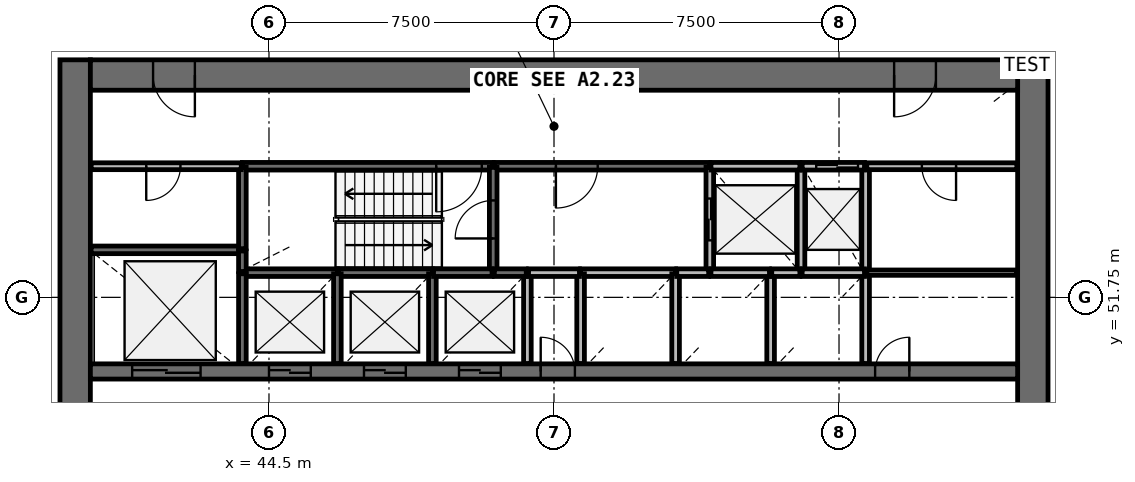
"""IFC4 building model, lengths in metres.
Left out: names, types, materials, properties, quantities, classifications, styles, units other than length and angle.
Written with IfcOpenShell. Run it as: python <this file> out.ifc"""

import sys

from ifc_helpers import new_model, si_unit, direction, frame, frame_2d, origin, place, context, subcontext, project, spatial, rectangle, extrude, source, transform, mapped, element, fill, save


model = new_model("IFC4")
c1 = context("Model", 3, precision=1e-05, world=origin(), true_north=direction((0.0, 1.0)))
c2 = subcontext(c1, "Body", "Model", "MODEL_VIEW")
j1 = project(units=[si_unit("LENGTHUNIT", "METRE"), si_unit("PLANEANGLEUNIT", "RADIAN")], contexts=[c1])
p1 = place(None, origin())
s1 = spatial("IfcSite", under=j1, at=p1, CompositionType="ELEMENT")
p2 = place(p1, origin())
s2 = spatial("IfcBuilding", under=s1, at=p2, CompositionType="ELEMENT")
p3 = place(p2, frame((0.0, 0.0, 96.2)))
s3 = spatial("IfcBuildingStorey", under=s2, at=p3, CompositionType="ELEMENT", Elevation=96.2)
p4 = place(p3, frame((64.6, 38.0, 0.0), z_axis=(0.0, 0.0, 1.0), x_axis=(0.0, 1.0, 0.0)))
e1 = element("IfcWall", 1, at=p4, inside=s3, PredefinedType="SHEAR", context=c2, shape_type="SweptSolid", body=[
    extrude(rectangle(XDim=20.0, YDim=0.8, at=frame_2d((10.0, 0.0))), origin(), (0.0, 0.0, 1.0), 4.1),
])
p5 = place(p4, frame((9.1, 0.0, 0.0)))
e2 = element("IfcOpeningElement", 2, at=p5, cuts=e1, PredefinedType="OPENING", context=c2, shape_type="SweptSolid", body=[
    extrude(rectangle(XDim=1.8, YDim=2.1, at=frame_2d((0.9, 1.05))), frame((0.0, 0.41, 0.0), z_axis=(0.0, -1.0, 0.0), x_axis=(1.0, 0.0, 0.0)), (0.0, 0.0, 1.0), 0.82),
])
p6 = place(p3, frame((39.4, 58.0, 0.0), z_axis=(0.0, 0.0, 1.0), x_axis=(0.0, -1.0, 0.0)))
e3 = element("IfcWall", 3, at=p6, inside=s3, PredefinedType="SHEAR", context=c2, shape_type="SweptSolid", body=[
    extrude(rectangle(XDim=20.0, YDim=0.8, at=frame_2d((10.0, 0.0))), origin(), (0.0, 0.0, 1.0), 4.1),
])
p7 = place(p6, frame((9.1, 0.0, 0.0)))
e4 = element("IfcOpeningElement", 4, at=p7, cuts=e3, PredefinedType="OPENING", context=c2, shape_type="SweptSolid", body=[
    extrude(rectangle(XDim=1.8, YDim=2.1, at=frame_2d((0.9, 1.05))), frame((0.0, 0.41, 0.0), z_axis=(0.0, -1.0, 0.0), x_axis=(1.0, 0.0, 0.0)), (0.0, 0.0, 1.0), 0.82),
])
p8 = place(p3, frame((64.2, 57.6, 0.0), z_axis=(0.0, 0.0, 1.0), x_axis=(-1.0, 0.0, 0.0)))
e5 = element("IfcWall", 5, at=p8, inside=s3, PredefinedType="SHEAR", context=c2, shape_type="SweptSolid", body=[
    extrude(rectangle(XDim=24.4, YDim=0.8, at=frame_2d((12.2, 0.0))), origin(), (0.0, 0.0, 1.0), 4.1),
])
p9 = place(p8, frame((21.65, 0.0, 0.0)))
e6 = element("IfcOpeningElement", 6, at=p9, cuts=e5, PredefinedType="OPENING", context=c2, shape_type="SweptSolid", body=[
    extrude(rectangle(XDim=1.1, YDim=2.1, at=frame_2d((0.55, 1.05))), frame((0.0, 0.41, 0.0), z_axis=(0.0, -1.0, 0.0), x_axis=(1.0, 0.0, 0.0)), (0.0, 0.0, 1.0), 0.82),
])
p10 = place(p8, frame((2.15, 0.0, 0.0)))
e7 = element("IfcOpeningElement", 7, at=p10, cuts=e5, PredefinedType="OPENING", context=c2, shape_type="SweptSolid", body=[
    extrude(rectangle(XDim=1.1, YDim=2.1, at=frame_2d((0.55, 1.05))), frame((0.0, 0.41, 0.0), z_axis=(0.0, -1.0, 0.0), x_axis=(1.0, 0.0, 0.0)), (0.0, 0.0, 1.0), 0.82),
])
p11 = place(p3, frame((39.8, 49.8, 0.0), z_axis=(0.0, 0.0, 1.0), x_axis=(1.0, 0.0, 0.0)))
e8 = element("IfcWall", 8, at=p11, inside=s3, PredefinedType="SHEAR", context=c2, shape_type="SweptSolid", body=[
    extrude(rectangle(XDim=24.4, YDim=0.4, at=frame_2d((12.2, 0.0))), origin(), (0.0, 0.0, 1.0), 4.1),
])
p12 = place(p11, frame((4.7, 0.0, 0.0)))
e9 = element("IfcOpeningElement", 9, at=p12, cuts=e8, PredefinedType="OPENING", context=c2, shape_type="SweptSolid", body=[
    extrude(rectangle(XDim=1.1, YDim=2.1, at=frame_2d((0.55, 1.05))), frame((0.0, 0.21, 0.0), z_axis=(0.0, -1.0, 0.0), x_axis=(1.0, 0.0, 0.0)), (0.0, 0.0, 1.0), 0.42),
])
p13 = place(p11, frame((7.2, 0.0, 0.0)))
e10 = element("IfcOpeningElement", 10, at=p13, cuts=e8, PredefinedType="OPENING", context=c2, shape_type="SweptSolid", body=[
    extrude(rectangle(XDim=1.1, YDim=2.1, at=frame_2d((0.55, 1.05))), frame((0.0, 0.21, 0.0), z_axis=(0.0, -1.0, 0.0), x_axis=(1.0, 0.0, 0.0)), (0.0, 0.0, 1.0), 0.42),
])
p14 = place(p11, frame((9.7, 0.0, 0.0)))
e11 = element("IfcOpeningElement", 11, at=p14, cuts=e8, PredefinedType="OPENING", context=c2, shape_type="SweptSolid", body=[
    extrude(rectangle(XDim=1.1, YDim=2.1, at=frame_2d((0.55, 1.05))), frame((0.0, 0.21, 0.0), z_axis=(0.0, -1.0, 0.0), x_axis=(1.0, 0.0, 0.0)), (0.0, 0.0, 1.0), 0.42),
])
p15 = place(p11, frame((1.1, 0.0, 0.0)))
e12 = element("IfcOpeningElement", 12, at=p15, cuts=e8, PredefinedType="OPENING", context=c2, shape_type="SweptSolid", body=[
    extrude(rectangle(XDim=1.8, YDim=2.4, at=frame_2d((0.9, 1.2))), frame((0.0, 0.21, 0.0), z_axis=(0.0, -1.0, 0.0), x_axis=(1.0, 0.0, 0.0)), (0.0, 0.0, 1.0), 0.42),
])
p16 = place(p11, frame((20.65, 0.0, 0.0)))
e13 = element("IfcOpeningElement", 13, at=p16, cuts=e8, PredefinedType="OPENING", context=c2, shape_type="SweptSolid", body=[
    extrude(rectangle(XDim=0.9, YDim=2.1, at=frame_2d((0.45, 1.05))), frame((0.0, 0.21, 0.0), z_axis=(0.0, -1.0, 0.0), x_axis=(1.0, 0.0, 0.0)), (0.0, 0.0, 1.0), 0.42),
])
p17 = place(p11, frame((11.85, 0.0, 0.0)))
e14 = element("IfcOpeningElement", 14, at=p17, cuts=e8, PredefinedType="OPENING", context=c2, shape_type="SweptSolid", body=[
    extrude(rectangle(XDim=0.9, YDim=2.1, at=frame_2d((0.45, 1.05))), frame((0.0, 0.21, 0.0), z_axis=(0.0, -1.0, 0.0), x_axis=(1.0, 0.0, 0.0)), (0.0, 0.0, 1.0), 0.42),
])
p18 = place(p3, frame((50.4, 55.2, 0.0), z_axis=(0.0, 0.0, 1.0), x_axis=(-1.0, 0.0, 0.0)))
e15 = element("IfcWall", 15, at=p18, inside=s3, PredefinedType="SOLIDWALL", context=c2, shape_type="SweptSolid", body=[
    extrude(rectangle(XDim=6.6, YDim=0.2, at=frame_2d((3.3, 0.0))), origin(), (0.0, 0.0, 1.0), 3.7),
])
p19 = place(p18, frame((0.3, 0.0, 0.0)))
e16 = element("IfcOpeningElement", 16, at=p19, cuts=e15, PredefinedType="OPENING", context=c2, shape_type="SweptSolid", body=[
    extrude(rectangle(XDim=1.2, YDim=2.1, at=frame_2d((0.6, 1.05))), frame((0.0, 0.11, 0.0), z_axis=(0.0, -1.0, 0.0), x_axis=(1.0, 0.0, 0.0)), (0.0, 0.0, 1.0), 0.22),
])
p20 = place(p3, frame((56.1, 55.2, 0.0), z_axis=(0.0, 0.0, 1.0), x_axis=(-1.0, 0.0, 0.0)))
e17 = element("IfcWall", 17, at=p20, inside=s3, PredefinedType="SOLIDWALL", context=c2, shape_type="SweptSolid", body=[
    extrude(rectangle(XDim=5.67, YDim=0.2, at=frame_2d((2.835, 0.0))), origin(), (0.0, 0.0, 1.0), 3.7),
])
p21 = place(p20, frame((2.95, 0.0, 0.0)))
e18 = element("IfcOpeningElement", 18, at=p21, cuts=e17, PredefinedType="OPENING", context=c2, shape_type="SweptSolid", body=[
    extrude(rectangle(XDim=1.1, YDim=2.1, at=frame_2d((0.55, 1.05))), frame((0.0, 0.11, 0.0), z_axis=(0.0, -1.0, 0.0), x_axis=(1.0, 0.0, 0.0)), (0.0, 0.0, 1.0), 0.22),
])
p22 = place(p3, frame((43.8, 53.0, 0.0), z_axis=(0.0, 0.0, 1.0), x_axis=(-1.0, 0.0, 0.0)))
e19 = element("IfcWall", 19, at=p22, inside=s3, PredefinedType="SOLIDWALL", context=c2, shape_type="SweptSolid", body=[
    extrude(rectangle(XDim=3.98, YDim=0.2, at=frame_2d((1.99, 0.0))), origin(), (0.0, 0.0, 1.0), 3.7),
])
p23 = place(p3, frame((50.4, 52.4, 0.0), z_axis=(0.0, 0.0, 1.0), x_axis=(0.0, 1.0, 0.0)))
e20 = element("IfcWall", 20, at=p23, inside=s3, PredefinedType="SOLIDWALL", context=c2, shape_type="SweptSolid", body=[
    extrude(rectangle(XDim=2.77, YDim=0.2, at=frame_2d((1.385, 0.0))), origin(), (0.0, 0.0, 1.0), 3.7),
])
p24 = place(p23, frame((0.9, 0.0, 0.0)))
e21 = element("IfcOpeningElement", 21, at=p24, cuts=e20, PredefinedType="OPENING", context=c2, shape_type="SweptSolid", body=[
    extrude(rectangle(XDim=1.0, YDim=2.1, at=frame_2d((0.5, 1.05))), frame((0.0, 0.11, 0.0), z_axis=(0.0, -1.0, 0.0), x_axis=(1.0, 0.0, 0.0)), (0.0, 0.0, 1.0), 0.22),
])
p25 = place(p3, frame((56.1, 55.17, 0.0), z_axis=(0.0, 0.0, 1.0), x_axis=(0.0, -1.0, 0.0)))
e22 = element("IfcWall", 22, at=p25, inside=s3, PredefinedType="SOLIDWALL", context=c2, shape_type="SweptSolid", body=[
    extrude(rectangle(XDim=2.77, YDim=0.2, at=frame_2d((1.385, 0.0))), origin(), (0.0, 0.0, 1.0), 3.7),
])
p26 = place(p25, frame((0.82, 0.0, 0.0)))
e23 = element("IfcOpeningElement", 23, at=p26, cuts=e22, PredefinedType="OPENING", context=c2, shape_type="SweptSolid", body=[
    extrude(rectangle(XDim=1.1, YDim=2.1, at=frame_2d((0.55, 1.05))), frame((0.0, 0.11, 0.0), z_axis=(0.0, -1.0, 0.0), x_axis=(1.0, 0.0, 0.0)), (0.0, 0.0, 1.0), 0.22),
])
for number, where, z_axis, x_axis in (
    (24, (58.5, 52.4, 0.0), (0.0, 0.0, 1.0), (0.0, 1.0, 0.0)),
    (25, (60.2, 52.4, 0.0), (0.0, 0.0, 1.0), (0.0, 1.0, 0.0)),
):
    element("IfcWall", number, at=place(p3, frame(where, z_axis=z_axis, x_axis=x_axis)), inside=s3, PredefinedType="SOLIDWALL", context=c2, shape_type="SweptSolid", body=[
        extrude(rectangle(XDim=2.8, YDim=0.2, at=frame_2d((1.4, 0.0))), origin(), (0.0, 0.0, 1.0), 3.7),
    ])
p27 = place(p3, frame((46.3, 52.4, 0.0), z_axis=(0.0, 0.0, 1.0), x_axis=(-1.0, 0.0, 0.0)))
e26 = element("IfcWall", 26, at=p27, inside=s3, PredefinedType="SOLIDWALL", context=c2, shape_type="SweptSolid", body=[
    extrude(rectangle(XDim=2.5, YDim=0.2, at=frame_2d((1.25, 0.0))), origin(), (0.0, 0.0, 1.0), 3.7),
])
p28 = place(p3, frame((48.8, 52.4, 0.0), z_axis=(0.0, 0.0, 1.0), x_axis=(-1.0, 0.0, 0.0)))
e27 = element("IfcWall", 27, at=p28, inside=s3, PredefinedType="SOLIDWALL", context=c2, shape_type="SweptSolid", body=[
    extrude(rectangle(XDim=2.47, YDim=0.2, at=frame_2d((1.235, 0.0))), origin(), (0.0, 0.0, 1.0), 3.7),
])
p29 = place(p3, frame((55.2, 52.4, 0.0), z_axis=(0.0, 0.0, 1.0), x_axis=(-1.0, 0.0, 0.0)))
e28 = element("IfcWall", 28, at=p29, inside=s3, PredefinedType="SOLIDWALL", context=c2, shape_type="SweptSolid", body=[
    extrude(rectangle(XDim=2.5, YDim=0.2, at=frame_2d((1.25, 0.0))), origin(), (0.0, 0.0, 1.0), 3.7),
])
p30 = place(p3, frame((58.47, 55.2, 0.0), z_axis=(0.0, 0.0, 1.0), x_axis=(-1.0, 0.0, 0.0)))
e29 = element("IfcWall", 29, at=p30, inside=s3, PredefinedType="SOLIDWALL", context=c2, shape_type="SweptSolid", body=[
    extrude(rectangle(XDim=2.34, YDim=0.2, at=frame_2d((1.17, 0.0))), origin(), (0.0, 0.0, 1.0), 3.7),
])
for number, where, z_axis, x_axis in (
    (30, (43.8, 52.37, 0.0), (0.0, 0.0, 1.0), (0.0, -1.0, 0.0)),
    (31, (46.3, 50.01, 0.0), (0.0, 0.0, 1.0), (0.0, 1.0, 0.0)),
    (32, (48.8, 50.01, 0.0), (0.0, 0.0, 1.0), (0.0, 1.0, 0.0)),
):
    element("IfcWall", number, at=place(p3, frame(where, z_axis=z_axis, x_axis=x_axis)), inside=s3, PredefinedType="SOLIDWALL", context=c2, shape_type="SweptSolid", body=[
        extrude(rectangle(XDim=2.36, YDim=0.2, at=frame_2d((1.18, 0.0))), origin(), (0.0, 0.0, 1.0), 3.7),
    ])
p31 = place(p3, frame((51.3, 50.01, 0.0), z_axis=(0.0, 0.0, 1.0), x_axis=(0.0, 1.0, 0.0)))
e33 = element("IfcWall", 33, at=p31, inside=s3, PredefinedType="SOLIDWALL", context=c2, shape_type="SweptSolid", body=[
    extrude(rectangle(XDim=2.39, YDim=0.2, at=frame_2d((1.195, 0.0))), origin(), (0.0, 0.0, 1.0), 3.7),
])
for number, where, z_axis, x_axis in (
    (34, (52.7, 52.37, 0.0), (0.0, 0.0, 1.0), (0.0, -1.0, 0.0)),
    (35, (55.2, 50.01, 0.0), (0.0, 0.0, 1.0), (0.0, 1.0, 0.0)),
):
    element("IfcWall", number, at=place(p3, frame(where, z_axis=z_axis, x_axis=x_axis)), inside=s3, PredefinedType="SOLIDWALL", context=c2, shape_type="SweptSolid", body=[
        extrude(rectangle(XDim=2.36, YDim=0.2, at=frame_2d((1.18, 0.0))), origin(), (0.0, 0.0, 1.0), 3.7),
    ])
p32 = place(p3, frame((57.7, 50.01, 0.0), z_axis=(0.0, 0.0, 1.0), x_axis=(0.0, 1.0, 0.0)))
e36 = element("IfcWall", 36, at=p32, inside=s3, PredefinedType="SOLIDWALL", context=c2, shape_type="SweptSolid", body=[
    extrude(rectangle(XDim=2.39, YDim=0.2, at=frame_2d((1.195, 0.0))), origin(), (0.0, 0.0, 1.0), 3.7),
])
p33 = place(p3, frame((60.2, 50.01, 0.0), z_axis=(0.0, 0.0, 1.0), x_axis=(0.0, 1.0, 0.0)))
e37 = element("IfcWall", 37, at=p33, inside=s3, PredefinedType="SOLIDWALL", context=c2, shape_type="SweptSolid", body=[
    extrude(rectangle(XDim=2.36, YDim=0.2, at=frame_2d((1.18, 0.0))), origin(), (0.0, 0.0, 1.0), 3.7),
])
p34 = place(p3, frame((43.8, 55.17, 0.0), z_axis=(0.0, 0.0, 1.0), x_axis=(0.0, -1.0, 0.0)))
e38 = element("IfcWall", 38, at=p34, inside=s3, PredefinedType="SOLIDWALL", context=c2, shape_type="SweptSolid", body=[
    extrude(rectangle(XDim=2.14, YDim=0.2, at=frame_2d((1.07, 0.0))), origin(), (0.0, 0.0, 1.0), 3.7),
])
p35 = place(p3, frame((60.17, 52.4, 0.0), z_axis=(0.0, 0.0, 1.0), x_axis=(-1.0, 0.0, 0.0)))
e39 = element("IfcWall", 39, at=p35, inside=s3, PredefinedType="SOLIDWALL", context=c2, shape_type="SweptSolid", body=[
    extrude(rectangle(XDim=1.64, YDim=0.2, at=frame_2d((0.82, 0.0))), origin(), (0.0, 0.0, 1.0), 3.7),
])
p36 = place(p3, frame((60.17, 55.2, 0.0), z_axis=(0.0, 0.0, 1.0), x_axis=(-1.0, 0.0, 0.0)))
e40 = element("IfcWall", 40, at=p36, inside=s3, PredefinedType="SOLIDWALL", context=c2, shape_type="SweptSolid", body=[
    extrude(rectangle(XDim=1.64, YDim=0.2, at=frame_2d((0.82, 0.0))), origin(), (0.0, 0.0, 1.0), 3.7),
])
p37 = place(p36, frame((0.17, 0.0, 0.0)))
e41 = element("IfcOpeningElement", 41, at=p37, cuts=e40, PredefinedType="OPENING", context=c2, shape_type="SweptSolid", body=[
    extrude(rectangle(XDim=1.1, YDim=2.1, at=frame_2d((0.55, 1.05))), frame((0.0, 0.11, 0.0), z_axis=(0.0, -1.0, 0.0), x_axis=(1.0, 0.0, 0.0)), (0.0, 0.0, 1.0), 0.22),
])
for number, where, z_axis, x_axis in (
    (42, (50.37, 52.4, 0.0), (0.0, 0.0, 1.0), (-1.0, 0.0, 0.0)),
    (43, (57.67, 52.4, 0.0), (0.0, 0.0, 1.0), (-1.0, 0.0, 0.0)),
):
    element("IfcWall", number, at=place(p3, frame(where, z_axis=z_axis, x_axis=x_axis)), inside=s3, PredefinedType="SOLIDWALL", context=c2, shape_type="SweptSolid", body=[
        extrude(rectangle(XDim=1.54, YDim=0.2, at=frame_2d((0.77, 0.0))), origin(), (0.0, 0.0, 1.0), 3.7),
    ])
p38 = place(p3, frame((51.33, 52.4, 0.0), z_axis=(0.0, 0.0, 1.0), x_axis=(1.0, 0.0, 0.0)))
e44 = element("IfcWall", 44, at=p38, inside=s3, PredefinedType="SOLIDWALL", context=c2, shape_type="SweptSolid", body=[
    extrude(rectangle(XDim=1.34, YDim=0.2, at=frame_2d((0.67, 0.0))), origin(), (0.0, 0.0, 1.0), 3.7),
])
for number, where, z_axis, x_axis in (
    (45, (51.27, 52.4, 0.0), (0.0, 0.0, 1.0), (-1.0, 0.0, 0.0)),
    (46, (56.07, 52.4, 0.0), (0.0, 0.0, 1.0), (-1.0, 0.0, 0.0)),
):
    element("IfcWall", number, at=place(p3, frame(where, z_axis=z_axis, x_axis=x_axis)), inside=s3, PredefinedType="SOLIDWALL", context=c2, shape_type="SweptSolid", body=[
        extrude(rectangle(XDim=0.84, YDim=0.2, at=frame_2d((0.42, 0.0))), origin(), (0.0, 0.0, 1.0), 3.7),
    ])
p39 = place(p3, frame((58.47, 52.4, 0.0), z_axis=(0.0, 0.0, 1.0), x_axis=(-1.0, 0.0, 0.0)))
e47 = element("IfcWall", 47, at=p39, inside=s3, PredefinedType="SOLIDWALL", context=c2, shape_type="SweptSolid", body=[
    extrude(rectangle(XDim=0.74, YDim=0.2, at=frame_2d((0.37, 0.0))), origin(), (0.0, 0.0, 1.0), 3.7),
])
p40 = place(p3, frame((43.8, 52.43, 0.0), z_axis=(0.0, 0.0, 1.0), x_axis=(0.0, 1.0, 0.0)))
e48 = element("IfcWall", 48, at=p40, inside=s3, PredefinedType="SOLIDWALL", context=c2, shape_type="SweptSolid", body=[
    extrude(rectangle(XDim=0.54, YDim=0.2, at=frame_2d((0.27, 0.0))), origin(), (0.0, 0.0, 1.0), 3.7),
])
p41 = place(p3, frame((64.18, 55.2, 0.0), z_axis=(0.0, 0.0, 1.0), x_axis=(-1.0, 0.0, 0.0)))
e49 = element("IfcWall", 49, at=p41, inside=s3, PredefinedType="PARTITIONING", context=c2, shape_type="SweptSolid", body=[
    extrude(rectangle(XDim=3.95, YDim=0.18, at=frame_2d((1.975, 0.0))), origin(), (0.0, 0.0, 1.0), 3.7),
])
p42 = place(p41, frame((1.6, 0.0, 0.0)))
e50 = element("IfcOpeningElement", 50, at=p42, cuts=e49, PredefinedType="OPENING", context=c2, shape_type="SweptSolid", body=[
    extrude(rectangle(XDim=0.9, YDim=2.1, at=frame_2d((0.45, 1.05))), frame((0.0, 0.1, 0.0), z_axis=(0.0, -1.0, 0.0), x_axis=(1.0, 0.0, 0.0)), (0.0, 0.0, 1.0), 0.2),
])
p43 = place(p3, frame((43.77, 55.2, 0.0), z_axis=(0.0, 0.0, 1.0), x_axis=(-1.0, 0.0, 0.0)))
e51 = element("IfcWall", 51, at=p43, inside=s3, PredefinedType="PARTITIONING", context=c2, shape_type="SweptSolid", body=[
    extrude(rectangle(XDim=3.95, YDim=0.18, at=frame_2d((1.975, 0.0))), origin(), (0.0, 0.0, 1.0), 3.7),
])
p44 = place(p43, frame((1.6, 0.0, 0.0)))
e52 = element("IfcOpeningElement", 52, at=p44, cuts=e51, PredefinedType="OPENING", context=c2, shape_type="SweptSolid", body=[
    extrude(rectangle(XDim=0.9, YDim=2.1, at=frame_2d((0.45, 1.05))), frame((0.0, 0.1, 0.0), z_axis=(0.0, -1.0, 0.0), x_axis=(1.0, 0.0, 0.0)), (0.0, 0.0, 1.0), 0.2),
])
p45 = place(p3, frame((64.18, 52.4, 0.0), z_axis=(0.0, 0.0, 1.0), x_axis=(-1.0, 0.0, 0.0)))
e53 = element("IfcWall", 53, at=p45, inside=s3, PredefinedType="PARTITIONING", context=c2, shape_type="SweptSolid", body=[
    extrude(rectangle(XDim=3.95, YDim=0.14, at=frame_2d((1.975, 0.0))), origin(), (0.0, 0.0, 1.0), 2.9),
])
m1 = source(origin(), c2, "Body", "SweptSolid", [
    extrude(rectangle(XDim=1.1, YDim=2.1, at=frame_2d((0.55, 1.05))), frame((0.0, 0.025, 0.0), z_axis=(0.0, -1.0, 0.0), x_axis=(1.0, 0.0, 0.0)), (0.0, 0.0, 1.0), 0.05),
])
p46 = place(p12, origin())
e54 = element("IfcDoor", 54, at=p46, inside=s3, OperationType="DOUBLE_DOOR_SLIDING", PredefinedType="USERDEFINED", context=c2, shape_type="MappedRepresentation", body=[
    mapped(m1, transform((0.0, 0.0, 0.0), scale=1.0)),
])
fill(e9, e54)
p47 = place(p13, origin())
e55 = element("IfcDoor", 55, at=p47, inside=s3, OperationType="DOUBLE_DOOR_SLIDING", PredefinedType="USERDEFINED", context=c2, shape_type="MappedRepresentation", body=[
    mapped(m1, transform((0.0, 0.0, 0.0), scale=1.0)),
])
fill(e10, e55)
p48 = place(p14, origin())
e56 = element("IfcDoor", 56, at=p48, inside=s3, OperationType="DOUBLE_DOOR_SLIDING", PredefinedType="USERDEFINED", context=c2, shape_type="MappedRepresentation", body=[
    mapped(m1, transform((0.0, 0.0, 0.0), scale=1.0)),
])
fill(e11, e56)
p49 = place(p26, origin())
e57 = element("IfcDoor", 57, at=p49, inside=s3, OperationType="DOUBLE_DOOR_SLIDING", PredefinedType="USERDEFINED", context=c2, shape_type="MappedRepresentation", body=[
    mapped(m1, transform((0.0, 0.0, 0.0), scale=1.0)),
])
fill(e23, e57)
p50 = place(p37, origin())
e58 = element("IfcDoor", 58, at=p50, inside=s3, OperationType="DOUBLE_DOOR_SLIDING", PredefinedType="USERDEFINED", context=c2, shape_type="MappedRepresentation", body=[
    mapped(m1, transform((0.0, 0.0, 0.0), scale=1.0)),
])
fill(e41, e58)
m2 = source(origin(), c2, "Body", "SweptSolid", [
    extrude(rectangle(XDim=1.8, YDim=2.4, at=frame_2d((0.9, 1.2))), frame((0.0, 0.025, 0.0), z_axis=(0.0, -1.0, 0.0), x_axis=(1.0, 0.0, 0.0)), (0.0, 0.0, 1.0), 0.05),
])
p51 = place(p15, origin())
e59 = element("IfcDoor", 59, at=p51, inside=s3, OperationType="DOUBLE_DOOR_SLIDING", PredefinedType="USERDEFINED", context=c2, shape_type="MappedRepresentation", body=[
    mapped(m2, transform((0.0, 0.0, 0.0), scale=1.0)),
])
fill(e12, e59)
m3 = source(origin(), c2, "Body", "SweptSolid", [
    extrude(rectangle(XDim=1.2, YDim=2.1, at=frame_2d((0.6, 1.05))), frame((0.0, 0.025, 0.0), z_axis=(0.0, -1.0, 0.0), x_axis=(1.0, 0.0, 0.0)), (0.0, 0.0, 1.0), 0.05),
])
p52 = place(p19, origin())
e60 = element("IfcDoor", 60, at=p52, inside=s3, OperationType="SINGLE_SWING_RIGHT", PredefinedType="DOOR", context=c2, shape_type="MappedRepresentation", body=[
    mapped(m3, transform((0.0, 0.0, 0.0), scale=1.0)),
])
fill(e16, e60)
m4 = source(origin(), c2, "Body", "SweptSolid", [
    extrude(rectangle(XDim=1.0, YDim=2.1, at=frame_2d((0.5, 1.05))), frame((0.0, 0.025, 0.0), z_axis=(0.0, -1.0, 0.0), x_axis=(1.0, 0.0, 0.0)), (0.0, 0.0, 1.0), 0.05),
])
p53 = place(p24, origin())
e61 = element("IfcDoor", 61, at=p53, inside=s3, OperationType="SINGLE_SWING_LEFT", PredefinedType="DOOR", context=c2, shape_type="MappedRepresentation", body=[
    mapped(m4, transform((0.0, 0.0, 0.0), scale=1.0)),
])
fill(e21, e61)
m5 = source(origin(), c2, "Body", "SweptSolid", [
    extrude(rectangle(XDim=1.1, YDim=2.1, at=frame_2d((0.55, 1.05))), frame((0.0, 0.025, 0.0), z_axis=(0.0, -1.0, 0.0), x_axis=(1.0, 0.0, 0.0)), (0.0, 0.0, 1.0), 0.05),
])
p54 = place(p21, origin())
e62 = element("IfcDoor", 62, at=p54, inside=s3, OperationType="SINGLE_SWING_RIGHT", PredefinedType="DOOR", context=c2, shape_type="MappedRepresentation", body=[
    mapped(m5, transform((0.0, 0.0, 0.0), scale=1.0)),
])
fill(e18, e62)
m6 = source(origin(), c2, "Body", "SweptSolid", [
    extrude(rectangle(XDim=1.1, YDim=2.1, at=frame_2d((0.55, 1.05))), frame((0.0, 0.025, 0.0), z_axis=(0.0, -1.0, 0.0), x_axis=(1.0, 0.0, 0.0)), (0.0, 0.0, 1.0), 0.05),
])
p55 = place(p9, origin())
e63 = element("IfcDoor", 63, at=p55, inside=s3, OperationType="SINGLE_SWING_LEFT", PredefinedType="DOOR", context=c2, shape_type="MappedRepresentation", body=[
    mapped(m6, transform((0.0, 0.0, 0.0), scale=1.0)),
])
fill(e6, e63)
p56 = place(p10, origin())
e64 = element("IfcDoor", 64, at=p56, inside=s3, OperationType="SINGLE_SWING_RIGHT", PredefinedType="DOOR", context=c2, shape_type="MappedRepresentation", body=[
    mapped(m6, transform((0.0, 0.0, 0.0), scale=1.0)),
])
fill(e7, e64)
m7 = source(origin(), c2, "Body", "SweptSolid", [
    extrude(rectangle(XDim=0.9, YDim=2.1, at=frame_2d((0.45, 1.05))), frame((0.0, 0.025, 0.0), z_axis=(0.0, -1.0, 0.0), x_axis=(1.0, 0.0, 0.0)), (0.0, 0.0, 1.0), 0.05),
])
p57 = place(p44, origin())
e65 = element("IfcDoor", 65, at=p57, inside=s3, OperationType="SINGLE_SWING_RIGHT", PredefinedType="DOOR", context=c2, shape_type="MappedRepresentation", body=[
    mapped(m7, transform((0.0, 0.0, 0.0), scale=1.0)),
])
fill(e52, e65)
p58 = place(p16, origin())
e66 = element("IfcDoor", 66, at=p58, inside=s3, OperationType="SINGLE_SWING_RIGHT", PredefinedType="DOOR", context=c2, shape_type="MappedRepresentation", body=[
    mapped(m7, transform((0.0, 0.0, 0.0), scale=1.0)),
])
fill(e13, e66)
p59 = place(p42, origin())
e67 = element("IfcDoor", 67, at=p59, inside=s3, OperationType="SINGLE_SWING_LEFT", PredefinedType="DOOR", context=c2, shape_type="MappedRepresentation", body=[
    mapped(m7, transform((0.0, 0.0, 0.0), scale=1.0)),
])
fill(e50, e67)
p60 = place(p17, origin())
e68 = element("IfcDoor", 68, at=p60, inside=s3, OperationType="SINGLE_SWING_LEFT", PredefinedType="DOOR", context=c2, shape_type="MappedRepresentation", body=[
    mapped(m7, transform((0.0, 0.0, 0.0), scale=1.0)),
])
fill(e14, e68)
save(model, sys.argv[1])
